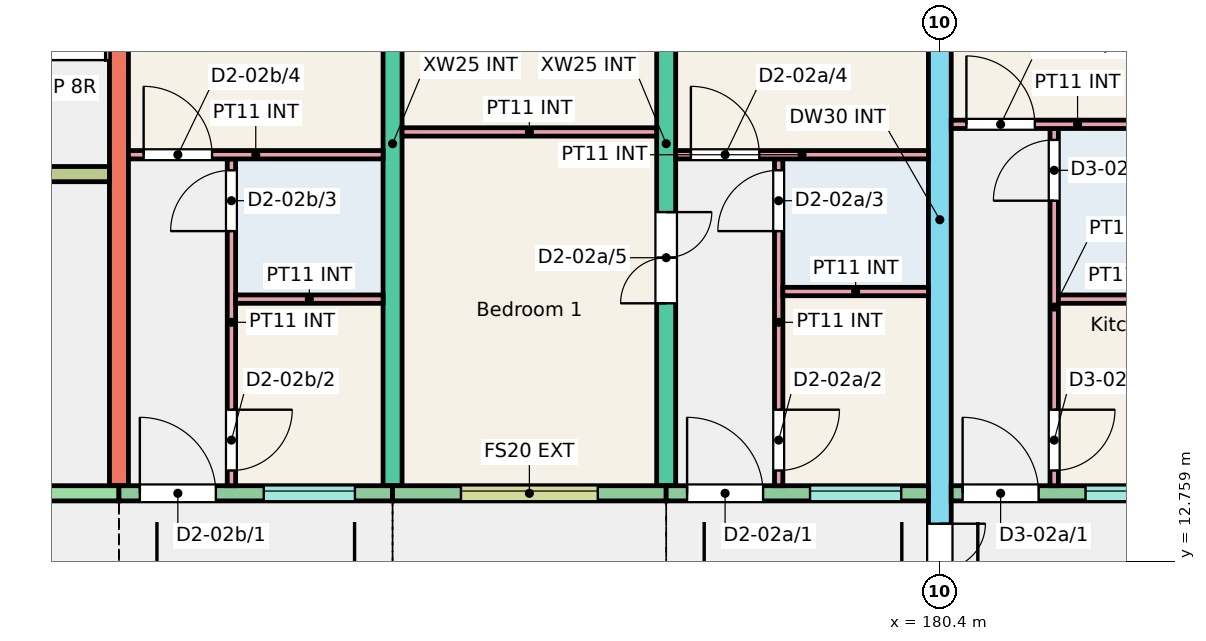
"""IFC4 building model, lengths in metres.
Left out: names, types, materials, properties, quantities, classifications, styles, units other than length and angle.
Written with IfcOpenShell. Run it as: python <this file> out.ifc"""

import sys

from ifc_helpers import new_model, si_unit, direction, frame, frame_2d, origin, place, context, subcontext, project, spatial, rectangle, extrude, element, fill, save


model = new_model("IFC4")
c1 = context("Model", 3, precision=1e-05, world=origin(), true_north=direction((0.0, 1.0)))
c2 = subcontext(c1, "Body", "Model", "MODEL_VIEW")
j1 = project(units=[si_unit("LENGTHUNIT", "METRE"), si_unit("PLANEANGLEUNIT", "RADIAN")], contexts=[c1])
p1 = place(None, origin())
s1 = spatial("IfcSite", under=j1, at=p1, CompositionType="ELEMENT")
p2 = place(p1, origin())
s2 = spatial("IfcBuilding", under=s1, at=p2, CompositionType="ELEMENT")
p3 = place(p2, frame((0.0, 0.0, 6.0)))
s3 = spatial("IfcBuildingStorey", under=s2, at=p3, CompositionType="ELEMENT", Elevation=6.0)
for number, where, z_axis, x_axis in (
    (1, (169.6, 13.75, 0.0), (0.0, 0.0, 1.0), (0.0, 1.0, 0.0)),
    (2, (173.2, 13.75, 0.0), (0.0, 0.0, 1.0), (0.0, 1.0, 0.0)),
):
    element("IfcWall", number, at=place(p3, frame(where, z_axis=z_axis, x_axis=x_axis)), inside=s3, PredefinedType="SHEAR", context=c2, shape_type="SweptSolid", body=[
        extrude(rectangle(XDim=9.0, YDim=0.25, at=frame_2d((4.5, 0.0))), origin(), (0.0, 0.0, 1.0), 3.0),
    ])
p4 = place(p3, frame((176.8, 13.75, 0.0), z_axis=(0.0, 0.0, 1.0), x_axis=(0.0, 1.0, 0.0)))
e3 = element("IfcWall", 3, at=p4, inside=s3, PredefinedType="SHEAR", context=c2, shape_type="SweptSolid", body=[
    extrude(rectangle(XDim=9.0, YDim=0.25, at=frame_2d((4.5, 0.0))), origin(), (0.0, 0.0, 1.0), 3.0),
])
p5 = place(p4, frame((2.4, 0.0, 0.0)))
e4 = element("IfcOpeningElement", 4, at=p5, cuts=e3, PredefinedType="OPENING", context=c2, shape_type="SweptSolid", body=[
    extrude(rectangle(XDim=1.2, YDim=2.1, at=frame_2d((0.6, 1.05))), frame((0.0, 0.135, 0.0), z_axis=(0.0, -1.0, 0.0), x_axis=(1.0, 0.0, 0.0)), (0.0, 0.0, 1.0), 0.27),
])
p6 = place(p4, frame((6.4, 0.0, 0.0)))
e5 = element("IfcOpeningElement", 5, at=p6, cuts=e3, PredefinedType="OPENING", context=c2, shape_type="SweptSolid", body=[
    extrude(rectangle(XDim=1.2, YDim=2.1, at=frame_2d((0.6, 1.05))), frame((0.0, 0.135, 0.0), z_axis=(0.0, -1.0, 0.0), x_axis=(1.0, 0.0, 0.0)), (0.0, 0.0, 1.0), 0.27),
])
p7 = place(p3, frame((180.4, 11.75, 0.0), z_axis=(0.0, 0.0, 1.0), x_axis=(0.0, 1.0, 0.0)))
e6 = element("IfcWall", 6, at=p7, inside=s3, PredefinedType="SHEAR", context=c2, shape_type="SweptSolid", body=[
    extrude(rectangle(XDim=11.0, YDim=0.3, at=frame_2d((5.5, 0.0))), origin(), (0.0, 0.0, 1.0), 3.0),
])
p8 = place(p7, frame((0.3, 0.0, 0.0)))
e7 = element("IfcOpeningElement", 7, at=p8, cuts=e6, PredefinedType="OPENING", context=c2, shape_type="SweptSolid", body=[
    extrude(rectangle(XDim=1.2, YDim=2.1, at=frame_2d((0.6, 1.05))), frame((0.0, 0.16, 0.0), z_axis=(0.0, -1.0, 0.0), x_axis=(1.0, 0.0, 0.0)), (0.0, 0.0, 1.0), 0.32),
])
p9 = place(p3, frame((163.75, 13.65, 0.0), z_axis=(0.0, 0.0, 1.0), x_axis=(1.0, 0.0, 0.0)))
e8 = element("IfcWall", 8, at=p9, inside=s3, PredefinedType="SHEAR", context=c2, shape_type="SweptSolid", body=[
    extrude(rectangle(XDim=5.85, YDim=0.2, at=frame_2d((2.925, 0.0))), origin(), (0.0, 0.0, 1.0), 3.0),
])
p10 = place(p9, frame((2.312, 0.0, 0.0)))
e9 = element("IfcOpeningElement", 9, at=p10, cuts=e8, PredefinedType="OPENING", context=c2, shape_type="SweptSolid", body=[
    extrude(rectangle(XDim=1.1, YDim=2.1, at=frame_2d((0.55, 1.05))), frame((0.0, 0.11, 0.0), z_axis=(0.0, -1.0, 0.0), x_axis=(1.0, 0.0, 0.0)), (0.0, 0.0, 1.0), 0.22),
])
p11 = place(p3, frame((163.75, 17.85, 0.0), z_axis=(0.0, 0.0, 1.0), x_axis=(1.0, 0.0, 0.0)))
e10 = element("IfcWall", 10, at=p11, inside=s3, PredefinedType="SHEAR", context=c2, shape_type="SweptSolid", body=[
    extrude(rectangle(XDim=5.725, YDim=0.2, at=frame_2d((2.863, 0.0))), origin(), (0.0, 0.0, 1.0), 3.0),
])
p12 = place(p11, frame((3.775, 0.0, 0.0)))
e11 = element("IfcOpeningElement", 11, at=p12, cuts=e10, PredefinedType="OPENING", context=c2, shape_type="SweptSolid", body=[
    extrude(rectangle(XDim=1.0, YDim=2.1, at=frame_2d((0.5, 1.05))), frame((0.0, 0.11, 0.0), z_axis=(0.0, -1.0, 0.0), x_axis=(1.0, 0.0, 0.0)), (0.0, 0.0, 1.0), 0.22),
])
p13 = place(p11, frame((0.762, 0.0, 0.0)))
e12 = element("IfcOpeningElement", 12, at=p13, cuts=e10, PredefinedType="OPENING", context=c2, shape_type="SweptSolid", body=[
    extrude(rectangle(XDim=1.1, YDim=2.1, at=frame_2d((0.55, 1.05))), frame((0.0, 0.11, 0.0), z_axis=(0.0, -1.0, 0.0), x_axis=(1.0, 0.0, 0.0)), (0.0, 0.0, 1.0), 0.22),
])
p14 = place(p3, frame((169.6, 13.65, 0.0), z_axis=(0.0, 0.0, 1.0), x_axis=(1.0, 0.0, 0.0)))
e13 = element("IfcWall", 13, at=p14, inside=s3, PredefinedType="SOLIDWALL", context=c2, shape_type="SweptSolid", body=[
    extrude(rectangle(XDim=3.6, YDim=0.2, at=frame_2d((1.8, 0.0))), origin(), (0.0, 0.0, 1.0), 3.0),
])
p15 = place(p14, frame((1.905, 0.0, 1.1)))
e14 = element("IfcOpeningElement", 14, at=p15, cuts=e13, PredefinedType="OPENING", context=c2, shape_type="SweptSolid", body=[
    extrude(rectangle(XDim=1.2, YDim=1.3, at=frame_2d((0.6, 0.65))), frame((0.0, 0.11, 0.0), z_axis=(0.0, -1.0, 0.0), x_axis=(1.0, 0.0, 0.0)), (0.0, 0.0, 1.0), 0.22),
])
p16 = place(p14, frame((0.275, 0.0, 0.0)))
e15 = element("IfcOpeningElement", 15, at=p16, cuts=e13, PredefinedType="OPENING", context=c2, shape_type="SweptSolid", body=[
    extrude(rectangle(XDim=1.0, YDim=2.1, at=frame_2d((0.5, 1.05))), frame((0.0, 0.11, 0.0), z_axis=(0.0, -1.0, 0.0), x_axis=(1.0, 0.0, 0.0)), (0.0, 0.0, 1.0), 0.22),
])
p17 = place(p3, frame((173.2, 13.65, 0.0), z_axis=(0.0, 0.0, 1.0), x_axis=(1.0, 0.0, 0.0)))
e16 = element("IfcWall", 16, at=p17, inside=s3, PredefinedType="SOLIDWALL", context=c2, shape_type="SweptSolid", body=[
    extrude(rectangle(XDim=3.6, YDim=0.2, at=frame_2d((1.8, 0.0))), origin(), (0.0, 0.0, 1.0), 3.0),
])
p18 = place(p17, frame((0.9, 0.0, 1.1)))
e17 = element("IfcOpeningElement", 17, at=p18, cuts=e16, PredefinedType="OPENING", context=c2, shape_type="SweptSolid", body=[
    extrude(rectangle(XDim=1.8, YDim=1.3, at=frame_2d((0.9, 0.65))), frame((0.0, 0.11, 0.0), z_axis=(0.0, -1.0, 0.0), x_axis=(1.0, 0.0, 0.0)), (0.0, 0.0, 1.0), 0.22),
])
p19 = place(p3, frame((176.8, 13.65, 0.0), z_axis=(0.0, 0.0, 1.0), x_axis=(1.0, 0.0, 0.0)))
e18 = element("IfcWall", 18, at=p19, inside=s3, PredefinedType="SOLIDWALL", context=c2, shape_type="SweptSolid", body=[
    extrude(rectangle(XDim=3.45, YDim=0.2, at=frame_2d((1.725, 0.0))), origin(), (0.0, 0.0, 1.0), 3.0),
])
p20 = place(p19, frame((1.893, 0.0, 1.1)))
e19 = element("IfcOpeningElement", 19, at=p20, cuts=e18, PredefinedType="OPENING", context=c2, shape_type="SweptSolid", body=[
    extrude(rectangle(XDim=1.2, YDim=1.3, at=frame_2d((0.6, 0.65))), frame((0.0, 0.11, 0.0), z_axis=(0.0, -1.0, 0.0), x_axis=(1.0, 0.0, 0.0)), (0.0, 0.0, 1.0), 0.22),
])
p21 = place(p19, frame((0.275, 0.0, 0.0)))
e20 = element("IfcOpeningElement", 20, at=p21, cuts=e18, PredefinedType="OPENING", context=c2, shape_type="SweptSolid", body=[
    extrude(rectangle(XDim=1.0, YDim=2.1, at=frame_2d((0.5, 1.05))), frame((0.0, 0.11, 0.0), z_axis=(0.0, -1.0, 0.0), x_axis=(1.0, 0.0, 0.0)), (0.0, 0.0, 1.0), 0.22),
])
p22 = place(p3, frame((180.55, 13.65, 0.0), z_axis=(0.0, 0.0, 1.0), x_axis=(1.0, 0.0, 0.0)))
e21 = element("IfcWall", 21, at=p22, inside=s3, PredefinedType="SOLIDWALL", context=c2, shape_type="SweptSolid", body=[
    extrude(rectangle(XDim=3.45, YDim=0.2, at=frame_2d((1.725, 0.0))), origin(), (0.0, 0.0, 1.0), 3.0),
])
p23 = place(p22, frame((1.768, 0.0, 1.1)))
e22 = element("IfcOpeningElement", 22, at=p23, cuts=e21, PredefinedType="OPENING", context=c2, shape_type="SweptSolid", body=[
    extrude(rectangle(XDim=1.2, YDim=1.3, at=frame_2d((0.6, 0.65))), frame((0.0, 0.11, 0.0), z_axis=(0.0, -1.0, 0.0), x_axis=(1.0, 0.0, 0.0)), (0.0, 0.0, 1.0), 0.22),
])
p24 = place(p22, frame((0.15, 0.0, 0.0)))
e23 = element("IfcOpeningElement", 23, at=p24, cuts=e21, PredefinedType="OPENING", context=c2, shape_type="SweptSolid", body=[
    extrude(rectangle(XDim=1.0, YDim=2.1, at=frame_2d((0.5, 1.05))), frame((0.0, 0.11, 0.0), z_axis=(0.0, -1.0, 0.0), x_axis=(1.0, 0.0, 0.0)), (0.0, 0.0, 1.0), 0.22),
])
p25 = place(p3, frame((178.28, 13.75, 0.0), z_axis=(0.0, 0.0, 1.0), x_axis=(0.0, 1.0, 0.0)))
e24 = element("IfcWall", 24, at=p25, inside=s3, PredefinedType="PARTITIONING", context=c2, shape_type="SweptSolid", body=[
    extrude(rectangle(XDim=4.3, YDim=0.11, at=frame_2d((2.15, 0.0))), origin(), (0.0, 0.0, 1.0), 2.8),
])
p26 = place(p25, frame((0.2, 0.0, 0.0)))
e25 = element("IfcOpeningElement", 25, at=p26, cuts=e24, PredefinedType="OPENING", context=c2, shape_type="SweptSolid", body=[
    extrude(rectangle(XDim=0.8, YDim=2.1, at=frame_2d((0.4, 1.05))), frame((0.0, 0.065, 0.0), z_axis=(0.0, -1.0, 0.0), x_axis=(1.0, 0.0, 0.0)), (0.0, 0.0, 1.0), 0.13),
])
p27 = place(p25, frame((3.35, 0.0, 0.0)))
e26 = element("IfcOpeningElement", 26, at=p27, cuts=e24, PredefinedType="OPENING", context=c2, shape_type="SweptSolid", body=[
    extrude(rectangle(XDim=0.8, YDim=2.1, at=frame_2d((0.4, 1.05))), frame((0.0, 0.065, 0.0), z_axis=(0.0, -1.0, 0.0), x_axis=(1.0, 0.0, 0.0)), (0.0, 0.0, 1.0), 0.13),
])
p28 = place(p3, frame((178.335, 16.305, 0.0), z_axis=(0.0, 0.0, 1.0), x_axis=(1.0, 0.0, 0.0)))
e27 = element("IfcWall", 27, at=p28, inside=s3, PredefinedType="PARTITIONING", context=c2, shape_type="SweptSolid", body=[
    extrude(rectangle(XDim=1.915, YDim=0.11, at=frame_2d((0.958, 0.0))), origin(), (0.0, 0.0, 1.0), 2.8),
])
p29 = place(p3, frame((176.925, 18.105, 0.0), z_axis=(0.0, 0.0, 1.0), x_axis=(1.0, 0.0, 0.0)))
e28 = element("IfcWall", 28, at=p29, inside=s3, PredefinedType="PARTITIONING", context=c2, shape_type="SweptSolid", body=[
    extrude(rectangle(XDim=3.325, YDim=0.11, at=frame_2d((1.663, 0.0))), origin(), (0.0, 0.0, 1.0), 2.8),
])
p30 = place(p29, frame((0.2, 0.0, 0.0)))
e29 = element("IfcOpeningElement", 29, at=p30, cuts=e28, PredefinedType="OPENING", context=c2, shape_type="SweptSolid", body=[
    extrude(rectangle(XDim=0.9, YDim=2.1, at=frame_2d((0.45, 1.05))), frame((0.0, 0.065, 0.0), z_axis=(0.0, -1.0, 0.0), x_axis=(1.0, 0.0, 0.0)), (0.0, 0.0, 1.0), 0.13),
])
p31 = place(p3, frame((173.325, 18.405, 0.0), z_axis=(0.0, 0.0, 1.0), x_axis=(1.0, 0.0, 0.0)))
e30 = element("IfcWall", 30, at=p31, inside=s3, PredefinedType="PARTITIONING", context=c2, shape_type="SweptSolid", body=[
    extrude(rectangle(XDim=3.35, YDim=0.11, at=frame_2d((1.675, 0.0))), origin(), (0.0, 0.0, 1.0), 2.8),
])
p32 = place(p3, frame((171.08, 13.75, 0.0), z_axis=(0.0, 0.0, 1.0), x_axis=(0.0, 1.0, 0.0)))
e31 = element("IfcWall", 31, at=p32, inside=s3, PredefinedType="PARTITIONING", context=c2, shape_type="SweptSolid", body=[
    extrude(rectangle(XDim=4.3, YDim=0.11, at=frame_2d((2.15, 0.0))), origin(), (0.0, 0.0, 1.0), 2.8),
])
p33 = place(p32, frame((0.2, 0.0, 0.0)))
e32 = element("IfcOpeningElement", 32, at=p33, cuts=e31, PredefinedType="OPENING", context=c2, shape_type="SweptSolid", body=[
    extrude(rectangle(XDim=0.8, YDim=2.1, at=frame_2d((0.4, 1.05))), frame((0.0, 0.065, 0.0), z_axis=(0.0, -1.0, 0.0), x_axis=(1.0, 0.0, 0.0)), (0.0, 0.0, 1.0), 0.13),
])
p34 = place(p32, frame((3.35, 0.0, 0.0)))
e33 = element("IfcOpeningElement", 33, at=p34, cuts=e31, PredefinedType="OPENING", context=c2, shape_type="SweptSolid", body=[
    extrude(rectangle(XDim=0.8, YDim=2.1, at=frame_2d((0.4, 1.05))), frame((0.0, 0.065, 0.0), z_axis=(0.0, -1.0, 0.0), x_axis=(1.0, 0.0, 0.0)), (0.0, 0.0, 1.0), 0.13),
])
p35 = place(p3, frame((171.135, 16.205, 0.0), z_axis=(0.0, 0.0, 1.0), x_axis=(1.0, 0.0, 0.0)))
e34 = element("IfcWall", 34, at=p35, inside=s3, PredefinedType="PARTITIONING", context=c2, shape_type="SweptSolid", body=[
    extrude(rectangle(XDim=1.94, YDim=0.11, at=frame_2d((0.97, 0.0))), origin(), (0.0, 0.0, 1.0), 2.8),
])
p36 = place(p3, frame((169.725, 18.105, 0.0), z_axis=(0.0, 0.0, 1.0), x_axis=(1.0, 0.0, 0.0)))
e35 = element("IfcWall", 35, at=p36, inside=s3, PredefinedType="PARTITIONING", context=c2, shape_type="SweptSolid", body=[
    extrude(rectangle(XDim=3.35, YDim=0.11, at=frame_2d((1.675, 0.0))), origin(), (0.0, 0.0, 1.0), 2.8),
])
p37 = place(p36, frame((0.2, 0.0, 0.0)))
e36 = element("IfcOpeningElement", 36, at=p37, cuts=e35, PredefinedType="OPENING", context=c2, shape_type="SweptSolid", body=[
    extrude(rectangle(XDim=0.9, YDim=2.1, at=frame_2d((0.45, 1.05))), frame((0.0, 0.065, 0.0), z_axis=(0.0, -1.0, 0.0), x_axis=(1.0, 0.0, 0.0)), (0.0, 0.0, 1.0), 0.13),
])
p38 = place(p3, frame((181.905, 13.75, 0.0), z_axis=(0.0, 0.0, 1.0), x_axis=(0.0, 1.0, 0.0)))
e37 = element("IfcWall", 37, at=p38, inside=s3, PredefinedType="PARTITIONING", context=c2, shape_type="SweptSolid", body=[
    extrude(rectangle(XDim=4.7, YDim=0.11, at=frame_2d((2.35, 0.0))), origin(), (0.0, 0.0, 1.0), 2.8),
])
p39 = place(p38, frame((0.2, 0.0, 0.0)))
e38 = element("IfcOpeningElement", 38, at=p39, cuts=e37, PredefinedType="OPENING", context=c2, shape_type="SweptSolid", body=[
    extrude(rectangle(XDim=0.8, YDim=2.1, at=frame_2d((0.4, 1.05))), frame((0.0, 0.065, 0.0), z_axis=(0.0, -1.0, 0.0), x_axis=(1.0, 0.0, 0.0)), (0.0, 0.0, 1.0), 0.13),
])
p40 = place(p38, frame((3.75, 0.0, 0.0)))
e39 = element("IfcOpeningElement", 39, at=p40, cuts=e37, PredefinedType="OPENING", context=c2, shape_type="SweptSolid", body=[
    extrude(rectangle(XDim=0.8, YDim=2.1, at=frame_2d((0.4, 1.05))), frame((0.0, 0.065, 0.0), z_axis=(0.0, -1.0, 0.0), x_axis=(1.0, 0.0, 0.0)), (0.0, 0.0, 1.0), 0.13),
])
p41 = place(p3, frame((181.96, 16.205, 0.0), z_axis=(0.0, 0.0, 1.0), x_axis=(1.0, 0.0, 0.0)))
e40 = element("IfcWall", 40, at=p41, inside=s3, PredefinedType="PARTITIONING", context=c2, shape_type="SweptSolid", body=[
    extrude(rectangle(XDim=1.915, YDim=0.11, at=frame_2d((0.958, 0.0))), origin(), (0.0, 0.0, 1.0), 2.8),
])
p42 = place(p3, frame((180.55, 18.505, 0.0), z_axis=(0.0, 0.0, 1.0), x_axis=(1.0, 0.0, 0.0)))
e41 = element("IfcWall", 41, at=p42, inside=s3, PredefinedType="PARTITIONING", context=c2, shape_type="SweptSolid", body=[
    extrude(rectangle(XDim=3.325, YDim=0.11, at=frame_2d((1.663, 0.0))), origin(), (0.0, 0.0, 1.0), 2.8),
])
p43 = place(p42, frame((0.2, 0.0, 0.0)))
e42 = element("IfcOpeningElement", 42, at=p43, cuts=e41, PredefinedType="OPENING", context=c2, shape_type="SweptSolid", body=[
    extrude(rectangle(XDim=0.9, YDim=2.1, at=frame_2d((0.45, 1.05))), frame((0.0, 0.065, 0.0), z_axis=(0.0, -1.0, 0.0), x_axis=(1.0, 0.0, 0.0)), (0.0, 0.0, 1.0), 0.13),
])
p44 = place(p18, origin())
e43 = element("IfcWindow", 43, at=p44, inside=s3, PartitioningType="SINGLE_PANEL", PredefinedType="WINDOW", context=c2, shape_type="SweptSolid", body=[
    extrude(rectangle(XDim=1.8, YDim=1.3, at=frame_2d((0.9, 0.65))), frame((0.0, 0.06, 0.0), z_axis=(0.0, -1.0, 0.0), x_axis=(1.0, 0.0, 0.0)), (0.0, 0.0, 1.0), 0.06),
])
fill(e17, e43)
p45 = place(p20, origin())
e44 = element("IfcWindow", 44, at=p45, inside=s3, PartitioningType="SINGLE_PANEL", PredefinedType="WINDOW", context=c2, shape_type="SweptSolid", body=[
    extrude(rectangle(XDim=1.2, YDim=1.3, at=frame_2d((0.6, 0.65))), frame((0.0, 0.06, 0.0), z_axis=(0.0, -1.0, 0.0), x_axis=(1.0, 0.0, 0.0)), (0.0, 0.0, 1.0), 0.06),
])
fill(e19, e44)
p46 = place(p15, origin())
e45 = element("IfcWindow", 45, at=p46, inside=s3, PartitioningType="SINGLE_PANEL", PredefinedType="WINDOW", context=c2, shape_type="SweptSolid", body=[
    extrude(rectangle(XDim=1.2, YDim=1.3, at=frame_2d((0.6, 0.65))), frame((0.0, 0.06, 0.0), z_axis=(0.0, -1.0, 0.0), x_axis=(1.0, 0.0, 0.0)), (0.0, 0.0, 1.0), 0.06),
])
fill(e14, e45)
p47 = place(p23, origin())
e46 = element("IfcWindow", 46, at=p47, inside=s3, PartitioningType="SINGLE_PANEL", PredefinedType="WINDOW", context=c2, shape_type="SweptSolid", body=[
    extrude(rectangle(XDim=1.2, YDim=1.3, at=frame_2d((0.6, 0.65))), frame((0.0, 0.06, 0.0), z_axis=(0.0, -1.0, 0.0), x_axis=(1.0, 0.0, 0.0)), (0.0, 0.0, 1.0), 0.06),
])
fill(e22, e46)
p48 = place(p21, origin())
e47 = element("IfcDoor", 47, at=p48, inside=s3, OperationType="SINGLE_SWING_LEFT", PredefinedType="DOOR", context=c2, shape_type="SweptSolid", body=[
    extrude(rectangle(XDim=1.0, YDim=2.1, at=frame_2d((0.5, 1.05))), frame((0.0, 0.025, 0.0), z_axis=(0.0, -1.0, 0.0), x_axis=(1.0, 0.0, 0.0)), (0.0, 0.0, 1.0), 0.05),
])
fill(e20, e47)
p49 = place(p26, origin())
e48 = element("IfcDoor", 48, at=p49, inside=s3, OperationType="SINGLE_SWING_RIGHT", PredefinedType="DOOR", context=c2, shape_type="SweptSolid", body=[
    extrude(rectangle(XDim=0.8, YDim=2.1, at=frame_2d((0.4, 1.05))), frame((0.0, 0.025, 0.0), z_axis=(0.0, -1.0, 0.0), x_axis=(1.0, 0.0, 0.0)), (0.0, 0.0, 1.0), 0.05),
])
fill(e25, e48)
p50 = place(p27, origin())
e49 = element("IfcDoor", 49, at=p50, inside=s3, OperationType="SINGLE_SWING_LEFT", PredefinedType="DOOR", context=c2, shape_type="SweptSolid", body=[
    extrude(rectangle(XDim=0.8, YDim=2.1, at=frame_2d((0.4, 1.05))), frame((0.0, 0.025, 0.0), z_axis=(0.0, -1.0, 0.0), x_axis=(1.0, 0.0, 0.0)), (0.0, 0.0, 1.0), 0.05),
])
fill(e26, e49)
p51 = place(p30, origin())
e50 = element("IfcDoor", 50, at=p51, inside=s3, OperationType="SINGLE_SWING_LEFT", PredefinedType="DOOR", context=c2, shape_type="SweptSolid", body=[
    extrude(rectangle(XDim=0.9, YDim=2.1, at=frame_2d((0.45, 1.05))), frame((0.0, 0.025, 0.0), z_axis=(0.0, -1.0, 0.0), x_axis=(1.0, 0.0, 0.0)), (0.0, 0.0, 1.0), 0.05),
])
fill(e29, e50)
p52 = place(p5, origin())
e51 = element("IfcDoor", 51, at=p52, inside=s3, OperationType="DOUBLE_DOOR_SINGLE_SWING", PredefinedType="DOOR", context=c2, shape_type="SweptSolid", body=[
    extrude(rectangle(XDim=1.2, YDim=2.1, at=frame_2d((0.6, 1.05))), frame((0.0, 0.025, 0.0), z_axis=(0.0, -1.0, 0.0), x_axis=(1.0, 0.0, 0.0)), (0.0, 0.0, 1.0), 0.05),
])
fill(e4, e51)
p53 = place(p16, origin())
e52 = element("IfcDoor", 52, at=p53, inside=s3, OperationType="SINGLE_SWING_LEFT", PredefinedType="DOOR", context=c2, shape_type="SweptSolid", body=[
    extrude(rectangle(XDim=1.0, YDim=2.1, at=frame_2d((0.5, 1.05))), frame((0.0, 0.025, 0.0), z_axis=(0.0, -1.0, 0.0), x_axis=(1.0, 0.0, 0.0)), (0.0, 0.0, 1.0), 0.05),
])
fill(e15, e52)
p54 = place(p33, origin())
e53 = element("IfcDoor", 53, at=p54, inside=s3, OperationType="SINGLE_SWING_RIGHT", PredefinedType="DOOR", context=c2, shape_type="SweptSolid", body=[
    extrude(rectangle(XDim=0.8, YDim=2.1, at=frame_2d((0.4, 1.05))), frame((0.0, 0.025, 0.0), z_axis=(0.0, -1.0, 0.0), x_axis=(1.0, 0.0, 0.0)), (0.0, 0.0, 1.0), 0.05),
])
fill(e32, e53)
p55 = place(p34, origin())
e54 = element("IfcDoor", 54, at=p55, inside=s3, OperationType="SINGLE_SWING_LEFT", PredefinedType="DOOR", context=c2, shape_type="SweptSolid", body=[
    extrude(rectangle(XDim=0.8, YDim=2.1, at=frame_2d((0.4, 1.05))), frame((0.0, 0.025, 0.0), z_axis=(0.0, -1.0, 0.0), x_axis=(1.0, 0.0, 0.0)), (0.0, 0.0, 1.0), 0.05),
])
fill(e33, e54)
p56 = place(p37, origin())
e55 = element("IfcDoor", 55, at=p56, inside=s3, OperationType="SINGLE_SWING_LEFT", PredefinedType="DOOR", context=c2, shape_type="SweptSolid", body=[
    extrude(rectangle(XDim=0.9, YDim=2.1, at=frame_2d((0.45, 1.05))), frame((0.0, 0.025, 0.0), z_axis=(0.0, -1.0, 0.0), x_axis=(1.0, 0.0, 0.0)), (0.0, 0.0, 1.0), 0.05),
])
fill(e36, e55)
p57 = place(p24, origin())
e56 = element("IfcDoor", 56, at=p57, inside=s3, OperationType="SINGLE_SWING_LEFT", PredefinedType="DOOR", context=c2, shape_type="SweptSolid", body=[
    extrude(rectangle(XDim=1.0, YDim=2.1, at=frame_2d((0.5, 1.05))), frame((0.0, 0.025, 0.0), z_axis=(0.0, -1.0, 0.0), x_axis=(1.0, 0.0, 0.0)), (0.0, 0.0, 1.0), 0.05),
])
fill(e23, e56)
p58 = place(p39, origin())
e57 = element("IfcDoor", 57, at=p58, inside=s3, OperationType="SINGLE_SWING_RIGHT", PredefinedType="DOOR", context=c2, shape_type="SweptSolid", body=[
    extrude(rectangle(XDim=0.8, YDim=2.1, at=frame_2d((0.4, 1.05))), frame((0.0, 0.025, 0.0), z_axis=(0.0, -1.0, 0.0), x_axis=(1.0, 0.0, 0.0)), (0.0, 0.0, 1.0), 0.05),
])
fill(e38, e57)
p59 = place(p40, origin())
e58 = element("IfcDoor", 58, at=p59, inside=s3, OperationType="SINGLE_SWING_LEFT", PredefinedType="DOOR", context=c2, shape_type="SweptSolid", body=[
    extrude(rectangle(XDim=0.8, YDim=2.1, at=frame_2d((0.4, 1.05))), frame((0.0, 0.025, 0.0), z_axis=(0.0, -1.0, 0.0), x_axis=(1.0, 0.0, 0.0)), (0.0, 0.0, 1.0), 0.05),
])
fill(e39, e58)
p60 = place(p43, origin())
e59 = element("IfcDoor", 59, at=p60, inside=s3, OperationType="SINGLE_SWING_LEFT", PredefinedType="DOOR", context=c2, shape_type="SweptSolid", body=[
    extrude(rectangle(XDim=0.9, YDim=2.1, at=frame_2d((0.45, 1.05))), frame((0.0, 0.025, 0.0), z_axis=(0.0, -1.0, 0.0), x_axis=(1.0, 0.0, 0.0)), (0.0, 0.0, 1.0), 0.05),
])
fill(e42, e59)
p61 = place(p8, origin())
e60 = element("IfcDoor", 60, at=p61, inside=s3, OperationType="DOUBLE_DOOR_SINGLE_SWING", PredefinedType="DOOR", context=c2, shape_type="SweptSolid", body=[
    extrude(rectangle(XDim=1.2, YDim=2.1, at=frame_2d((0.6, 1.05))), frame((0.0, 0.025, 0.0), z_axis=(0.0, -1.0, 0.0), x_axis=(1.0, 0.0, 0.0)), (0.0, 0.0, 1.0), 0.05),
])
fill(e7, e60)
save(model, sys.argv[1])
